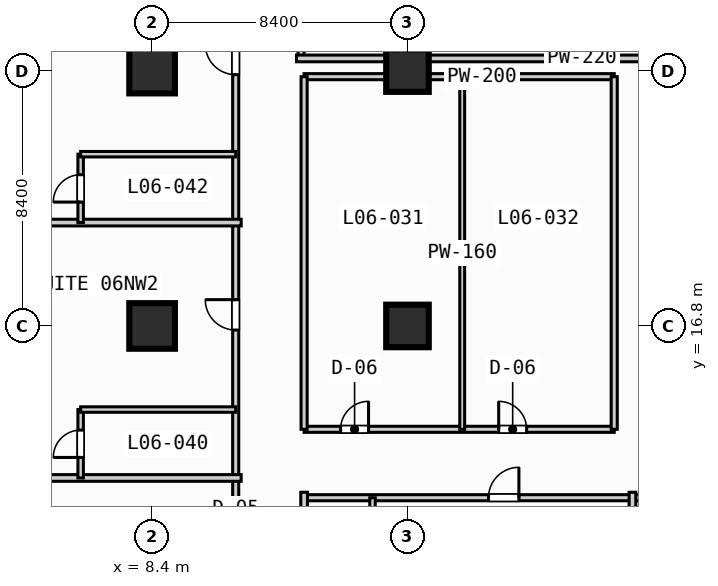
"""IFC4 building model, lengths in metres.
Left out: names, types, materials, properties, quantities, classifications, styles, units other than length and angle.
Written with IfcOpenShell. Run it as: python <this file> out.ifc"""

import sys

from ifc_helpers import new_model, si_unit, direction, frame, frame_2d, origin, origin_2d, place, context, subcontext, project, spatial, rectangle, extrude, element, fill, save


model = new_model("IFC4")
c1 = context("Model", 3, precision=1e-05, world=origin(), true_north=direction((0.0, 1.0)))
c2 = subcontext(c1, "Body", "Model", "MODEL_VIEW")
j1 = project(units=[si_unit("LENGTHUNIT", "METRE"), si_unit("PLANEANGLEUNIT", "RADIAN")], contexts=[c1])
p1 = place(None, origin())
s1 = spatial("IfcSite", under=j1, at=p1, CompositionType="ELEMENT")
p2 = place(p1, origin())
s2 = spatial("IfcBuilding", under=s1, at=p2, CompositionType="ELEMENT")
p3 = place(p2, frame((0.0, 0.0, 32.0)))
s3 = spatial("IfcBuildingStorey", under=s2, at=p3, CompositionType="ELEMENT", Elevation=32.0)
for number, where, z_axis, x_axis in (
    (1, (8.4, 16.8, 0.0), (0.0, 0.0, 1.0), (1.0, 0.0, 0.0)),
    (2, (8.4, 25.2, 0.0), (0.0, 0.0, 1.0), (1.0, 0.0, 0.0)),
):
    element("IfcColumn", number, at=place(p3, frame(where, z_axis=z_axis, x_axis=x_axis)), inside=s3, PredefinedType="COLUMN", context=c2, shape_type="SweptSolid", body=[
        extrude(rectangle(XDim=1.5, YDim=1.5, at=origin_2d()), origin(), (0.0, 0.0, 1.0), 3.8),
    ])
for number, where, z_axis, x_axis in (
    (3, (16.8, 16.8, 0.0), (0.0, 0.0, 1.0), (1.0, 0.0, 0.0)),
    (4, (16.8, 25.2, 0.0), (0.0, 0.0, 1.0), (1.0, 0.0, 0.0)),
):
    element("IfcColumn", number, at=place(p3, frame(where, z_axis=z_axis, x_axis=x_axis)), inside=s3, PredefinedType="COLUMN", context=c2, shape_type="SweptSolid", body=[
        extrude(rectangle(XDim=1.4, YDim=1.4, at=origin_2d()), origin(), (0.0, 0.0, 1.0), 3.8),
    ])
p4 = place(p3, frame((13.4, 13.4, 0.0), z_axis=(0.0, 0.0, 1.0), x_axis=(1.0, 0.0, 0.0)))
e5 = element("IfcWall", 5, at=p4, inside=s3, PredefinedType="PARTITIONING", context=c2, shape_type="SweptSolid", body=[
    extrude(rectangle(XDim=10.2, YDim=0.2, at=frame_2d((5.1, 0.0))), origin(), (0.0, 0.0, 1.0), 3.55),
])
p5 = place(p4, frame((1.2, 0.0, 0.0)))
e6 = element("IfcOpeningElement", 6, at=p5, cuts=e5, PredefinedType="OPENING", context=c2, shape_type="SweptSolid", body=[
    extrude(rectangle(XDim=0.92, YDim=2.1, at=frame_2d((0.46, 1.05))), frame((0.0, 0.11, 0.0), z_axis=(0.0, -1.0, 0.0), x_axis=(1.0, 0.0, 0.0)), (0.0, 0.0, 1.0), 0.22),
])
p6 = place(p4, frame((6.4, 0.0, 0.0)))
e7 = element("IfcOpeningElement", 7, at=p6, cuts=e5, PredefinedType="OPENING", context=c2, shape_type="SweptSolid", body=[
    extrude(rectangle(XDim=0.92, YDim=2.1, at=frame_2d((0.46, 1.05))), frame((0.0, 0.11, 0.0), z_axis=(0.0, -1.0, 0.0), x_axis=(1.0, 0.0, 0.0)), (0.0, 0.0, 1.0), 0.22),
])
p7 = place(p3, frame((18.6, 13.4, 0.0), z_axis=(0.0, 0.0, 1.0), x_axis=(0.0, 1.0, 0.0)))
e8 = element("IfcWall", 8, at=p7, inside=s3, PredefinedType="PARTITIONING", context=c2, shape_type="SweptSolid", body=[
    extrude(rectangle(XDim=11.6, YDim=0.16, at=frame_2d((5.8, 0.0))), origin(), (0.0, 0.0, 1.0), 3.55),
])
p8 = place(p3, frame((13.4, 25.0, 0.0), z_axis=(0.0, 0.0, 1.0), x_axis=(1.0, 0.0, 0.0)))
e9 = element("IfcWall", 9, at=p8, inside=s3, PredefinedType="PARTITIONING", context=c2, shape_type="SweptSolid", body=[
    extrude(rectangle(XDim=10.2, YDim=0.2, at=frame_2d((5.1, 0.0))), origin(), (0.0, 0.0, 1.0), 2.8),
])
for number, where, z_axis, x_axis in (
    (10, (13.4, 13.4, 0.0), (0.0, 0.0, 1.0), (0.0, 1.0, 0.0)),
    (11, (23.6, 13.4, 0.0), (0.0, 0.0, 1.0), (0.0, 1.0, 0.0)),
):
    element("IfcWall", number, at=place(p3, frame(where, z_axis=z_axis, x_axis=x_axis)), inside=s3, PredefinedType="PARTITIONING", context=c2, shape_type="SweptSolid", body=[
        extrude(rectangle(XDim=11.6, YDim=0.2, at=frame_2d((5.8, 0.0))), origin(), (0.0, 0.0, 1.0), 3.55),
    ])
p9 = place(p3, frame((13.3, 25.6, 0.0), z_axis=(0.0, 0.0, 1.0), x_axis=(0.0, 1.0, 0.0)))
e12 = element("IfcWall", 12, at=p9, inside=s3, PredefinedType="PARTITIONING", context=c2, shape_type="SweptSolid", body=[
    extrude(rectangle(XDim=13.6, YDim=0.2, at=frame_2d((6.8, 0.0))), origin(), (0.0, 0.0, 1.0), 3.55),
])
p10 = place(p9, frame((1.735, 0.0, 0.0)))
e13 = element("IfcOpeningElement", 13, at=p10, cuts=e12, PredefinedType="OPENING", context=c2, shape_type="SweptSolid", body=[
    extrude(rectangle(XDim=1.0, YDim=2.15, at=frame_2d((0.5, 1.075))), frame((0.0, 0.11, 0.0), z_axis=(0.0, -1.0, 0.0), x_axis=(1.0, 0.0, 0.0)), (0.0, 0.0, 1.0), 0.22),
])
p11 = place(p9, frame((8.535, 0.0, 0.0)))
e14 = element("IfcOpeningElement", 14, at=p11, cuts=e12, PredefinedType="OPENING", context=c2, shape_type="SweptSolid", body=[
    extrude(rectangle(XDim=1.0, YDim=2.15, at=frame_2d((0.5, 1.075))), frame((0.0, 0.11, 0.0), z_axis=(0.0, -1.0, 0.0), x_axis=(1.0, 0.0, 0.0)), (0.0, 0.0, 1.0), 0.22),
])
p12 = place(p3, frame((13.15, 25.6, 0.0), z_axis=(0.0, 0.0, 1.0), x_axis=(1.0, 0.0, 0.0)))
e15 = element("IfcWall", 15, at=p12, inside=s3, PredefinedType="PARTITIONING", context=c2, shape_type="SweptSolid", body=[
    extrude(rectangle(XDim=20.28, YDim=0.22, at=frame_2d((10.14, 0.0))), origin(), (0.0, 0.0, 1.0), 3.55),
])
p13 = place(p3, frame((11.15, 3.4, 0.0), z_axis=(0.0, 0.0, 1.0), x_axis=(0.0, 1.0, 0.0)))
e16 = element("IfcWall", 16, at=p13, inside=s3, PredefinedType="PARTITIONING", context=c2, shape_type="SweptSolid", body=[
    extrude(rectangle(XDim=85.4, YDim=0.2, at=frame_2d((42.7, 0.0))), origin(), (0.0, 0.0, 1.0), 3.55),
])
p14 = place(p13, frame((4.865, 0.0, 0.0)))
e17 = element("IfcOpeningElement", 17, at=p14, cuts=e16, PredefinedType="OPENING", context=c2, shape_type="SweptSolid", body=[
    extrude(rectangle(XDim=1.0, YDim=2.15, at=frame_2d((0.5, 1.075))), frame((0.0, 0.11, 0.0), z_axis=(0.0, -1.0, 0.0), x_axis=(1.0, 0.0, 0.0)), (0.0, 0.0, 1.0), 0.22),
])
p15 = place(p13, frame((13.265, 0.0, 0.0)))
e18 = element("IfcOpeningElement", 18, at=p15, cuts=e16, PredefinedType="OPENING", context=c2, shape_type="SweptSolid", body=[
    extrude(rectangle(XDim=1.0, YDim=2.15, at=frame_2d((0.5, 1.075))), frame((0.0, 0.11, 0.0), z_axis=(0.0, -1.0, 0.0), x_axis=(1.0, 0.0, 0.0)), (0.0, 0.0, 1.0), 0.22),
])
p16 = place(p13, frame((21.665, 0.0, 0.0)))
e19 = element("IfcOpeningElement", 19, at=p16, cuts=e16, PredefinedType="OPENING", context=c2, shape_type="SweptSolid", body=[
    extrude(rectangle(XDim=1.0, YDim=2.15, at=frame_2d((0.5, 1.075))), frame((0.0, 0.11, 0.0), z_axis=(0.0, -1.0, 0.0), x_axis=(1.0, 0.0, 0.0)), (0.0, 0.0, 1.0), 0.22),
])
p17 = place(p13, frame((30.065, 0.0, 0.0)))
e20 = element("IfcOpeningElement", 20, at=p17, cuts=e16, PredefinedType="OPENING", context=c2, shape_type="SweptSolid", body=[
    extrude(rectangle(XDim=1.0, YDim=2.15, at=frame_2d((0.5, 1.075))), frame((0.0, 0.11, 0.0), z_axis=(0.0, -1.0, 0.0), x_axis=(1.0, 0.0, 0.0)), (0.0, 0.0, 1.0), 0.22),
])
p18 = place(p13, frame((38.465, 0.0, 0.0)))
e21 = element("IfcOpeningElement", 21, at=p18, cuts=e16, PredefinedType="OPENING", context=c2, shape_type="SweptSolid", body=[
    extrude(rectangle(XDim=1.0, YDim=2.15, at=frame_2d((0.5, 1.075))), frame((0.0, 0.11, 0.0), z_axis=(0.0, -1.0, 0.0), x_axis=(1.0, 0.0, 0.0)), (0.0, 0.0, 1.0), 0.22),
])
p19 = place(p13, frame((46.865, 0.0, 0.0)))
e22 = element("IfcOpeningElement", 22, at=p19, cuts=e16, PredefinedType="OPENING", context=c2, shape_type="SweptSolid", body=[
    extrude(rectangle(XDim=1.0, YDim=2.15, at=frame_2d((0.5, 1.075))), frame((0.0, 0.11, 0.0), z_axis=(0.0, -1.0, 0.0), x_axis=(1.0, 0.0, 0.0)), (0.0, 0.0, 1.0), 0.22),
])
p20 = place(p13, frame((55.265, 0.0, 0.0)))
e23 = element("IfcOpeningElement", 23, at=p20, cuts=e16, PredefinedType="OPENING", context=c2, shape_type="SweptSolid", body=[
    extrude(rectangle(XDim=1.0, YDim=2.15, at=frame_2d((0.5, 1.075))), frame((0.0, 0.11, 0.0), z_axis=(0.0, -1.0, 0.0), x_axis=(1.0, 0.0, 0.0)), (0.0, 0.0, 1.0), 0.22),
])
p21 = place(p13, frame((63.665, 0.0, 0.0)))
e24 = element("IfcOpeningElement", 24, at=p21, cuts=e16, PredefinedType="OPENING", context=c2, shape_type="SweptSolid", body=[
    extrude(rectangle(XDim=1.0, YDim=2.15, at=frame_2d((0.5, 1.075))), frame((0.0, 0.11, 0.0), z_axis=(0.0, -1.0, 0.0), x_axis=(1.0, 0.0, 0.0)), (0.0, 0.0, 1.0), 0.22),
])
p22 = place(p13, frame((72.065, 0.0, 0.0)))
e25 = element("IfcOpeningElement", 25, at=p22, cuts=e16, PredefinedType="OPENING", context=c2, shape_type="SweptSolid", body=[
    extrude(rectangle(XDim=1.0, YDim=2.15, at=frame_2d((0.5, 1.075))), frame((0.0, 0.11, 0.0), z_axis=(0.0, -1.0, 0.0), x_axis=(1.0, 0.0, 0.0)), (0.0, 0.0, 1.0), 0.22),
])
p23 = place(p13, frame((81.165, 0.0, 0.0)))
e26 = element("IfcOpeningElement", 26, at=p23, cuts=e16, PredefinedType="OPENING", context=c2, shape_type="SweptSolid", body=[
    extrude(rectangle(XDim=1.0, YDim=2.15, at=frame_2d((0.5, 1.075))), frame((0.0, 0.11, 0.0), z_axis=(0.0, -1.0, 0.0), x_axis=(1.0, 0.0, 0.0)), (0.0, 0.0, 1.0), 0.22),
])
p24 = place(p3, frame((0.2, 11.8, 0.0), z_axis=(0.0, 0.0, 1.0), x_axis=(1.0, 0.0, 0.0)))
e27 = element("IfcWall", 27, at=p24, inside=s3, PredefinedType="PARTITIONING", context=c2, shape_type="SweptSolid", body=[
    extrude(rectangle(XDim=11.13, YDim=0.22, at=frame_2d((5.565, 0.0))), origin(), (0.0, 0.0, 1.0), 3.55),
])
p25 = place(p3, frame((6.05, 11.8, 0.0), z_axis=(0.0, 0.0, 1.0), x_axis=(0.0, 1.0, 0.0)))
e28 = element("IfcWall", 28, at=p25, inside=s3, PredefinedType="PLUMBINGWALL", context=c2, shape_type="SweptSolid", body=[
    extrude(rectangle(XDim=2.25, YDim=0.18, at=frame_2d((1.125, 0.0))), origin(), (0.0, 0.0, 1.0), 3.55),
])
p26 = place(p25, frame((0.675, 0.0, 0.0)))
e29 = element("IfcOpeningElement", 29, at=p26, cuts=e28, PredefinedType="OPENING", context=c2, shape_type="SweptSolid", body=[
    extrude(rectangle(XDim=0.9, YDim=2.1, at=frame_2d((0.45, 1.05))), frame((0.0, 0.1, 0.0), z_axis=(0.0, -1.0, 0.0), x_axis=(1.0, 0.0, 0.0)), (0.0, 0.0, 1.0), 0.2),
])
p27 = place(p3, frame((6.05, 14.05, 0.0), z_axis=(0.0, 0.0, 1.0), x_axis=(1.0, 0.0, 0.0)))
e30 = element("IfcWall", 30, at=p27, inside=s3, PredefinedType="PLUMBINGWALL", context=c2, shape_type="SweptSolid", body=[
    extrude(rectangle(XDim=5.1, YDim=0.18, at=frame_2d((2.55, 0.0))), origin(), (0.0, 0.0, 1.0), 3.55),
])
p28 = place(p3, frame((0.2, 20.2, 0.0), z_axis=(0.0, 0.0, 1.0), x_axis=(1.0, 0.0, 0.0)))
e31 = element("IfcWall", 31, at=p28, inside=s3, PredefinedType="PARTITIONING", context=c2, shape_type="SweptSolid", body=[
    extrude(rectangle(XDim=11.13, YDim=0.22, at=frame_2d((5.565, 0.0))), origin(), (0.0, 0.0, 1.0), 3.55),
])
p29 = place(p3, frame((6.05, 20.2, 0.0), z_axis=(0.0, 0.0, 1.0), x_axis=(0.0, 1.0, 0.0)))
e32 = element("IfcWall", 32, at=p29, inside=s3, PredefinedType="PLUMBINGWALL", context=c2, shape_type="SweptSolid", body=[
    extrude(rectangle(XDim=2.25, YDim=0.18, at=frame_2d((1.125, 0.0))), origin(), (0.0, 0.0, 1.0), 3.55),
])
p30 = place(p29, frame((0.675, 0.0, 0.0)))
e33 = element("IfcOpeningElement", 33, at=p30, cuts=e32, PredefinedType="OPENING", context=c2, shape_type="SweptSolid", body=[
    extrude(rectangle(XDim=0.9, YDim=2.1, at=frame_2d((0.45, 1.05))), frame((0.0, 0.1, 0.0), z_axis=(0.0, -1.0, 0.0), x_axis=(1.0, 0.0, 0.0)), (0.0, 0.0, 1.0), 0.2),
])
p31 = place(p3, frame((6.05, 22.45, 0.0), z_axis=(0.0, 0.0, 1.0), x_axis=(1.0, 0.0, 0.0)))
e34 = element("IfcWall", 34, at=p31, inside=s3, PredefinedType="PLUMBINGWALL", context=c2, shape_type="SweptSolid", body=[
    extrude(rectangle(XDim=5.1, YDim=0.18, at=frame_2d((2.55, 0.0))), origin(), (0.0, 0.0, 1.0), 3.55),
])
p32 = place(p3, frame((13.4, 11.15, 0.0), z_axis=(0.0, 0.0, 1.0), x_axis=(1.0, 0.0, 0.0)))
e35 = element("IfcWall", 35, at=p32, inside=s3, PredefinedType="PARTITIONING", context=c2, shape_type="SweptSolid", body=[
    extrude(rectangle(XDim=75.4, YDim=0.2, at=frame_2d((37.7, 0.0))), origin(), (0.0, 0.0, 1.0), 3.55),
])
p33 = place(p32, frame((6.065, 0.0, 0.0)))
e36 = element("IfcOpeningElement", 36, at=p33, cuts=e35, PredefinedType="OPENING", context=c2, shape_type="SweptSolid", body=[
    extrude(rectangle(XDim=1.0, YDim=2.15, at=frame_2d((0.5, 1.075))), frame((0.0, 0.11, 0.0), z_axis=(0.0, -1.0, 0.0), x_axis=(1.0, 0.0, 0.0)), (0.0, 0.0, 1.0), 0.22),
])
p34 = place(p32, frame((13.36, 0.0, 0.0)))
e37 = element("IfcOpeningElement", 37, at=p34, cuts=e35, PredefinedType="OPENING", context=c2, shape_type="SweptSolid", body=[
    extrude(rectangle(XDim=1.0, YDim=2.15, at=frame_2d((0.5, 1.075))), frame((0.0, 0.11, 0.0), z_axis=(0.0, -1.0, 0.0), x_axis=(1.0, 0.0, 0.0)), (0.0, 0.0, 1.0), 0.22),
])
p35 = place(p32, frame((21.785, 0.0, 0.0)))
e38 = element("IfcOpeningElement", 38, at=p35, cuts=e35, PredefinedType="OPENING", context=c2, shape_type="SweptSolid", body=[
    extrude(rectangle(XDim=1.0, YDim=2.15, at=frame_2d((0.5, 1.075))), frame((0.0, 0.11, 0.0), z_axis=(0.0, -1.0, 0.0), x_axis=(1.0, 0.0, 0.0)), (0.0, 0.0, 1.0), 0.22),
])
p36 = place(p32, frame((30.185, 0.0, 0.0)))
e39 = element("IfcOpeningElement", 39, at=p36, cuts=e35, PredefinedType="OPENING", context=c2, shape_type="SweptSolid", body=[
    extrude(rectangle(XDim=1.0, YDim=2.15, at=frame_2d((0.5, 1.075))), frame((0.0, 0.11, 0.0), z_axis=(0.0, -1.0, 0.0), x_axis=(1.0, 0.0, 0.0)), (0.0, 0.0, 1.0), 0.22),
])
p37 = place(p32, frame((41.76, 0.0, 0.0)))
e40 = element("IfcOpeningElement", 40, at=p37, cuts=e35, PredefinedType="OPENING", context=c2, shape_type="SweptSolid", body=[
    extrude(rectangle(XDim=1.0, YDim=2.15, at=frame_2d((0.5, 1.075))), frame((0.0, 0.11, 0.0), z_axis=(0.0, -1.0, 0.0), x_axis=(1.0, 0.0, 0.0)), (0.0, 0.0, 1.0), 0.22),
])
p38 = place(p32, frame((54.36, 0.0, 0.0)))
e41 = element("IfcOpeningElement", 41, at=p38, cuts=e35, PredefinedType="OPENING", context=c2, shape_type="SweptSolid", body=[
    extrude(rectangle(XDim=1.0, YDim=2.15, at=frame_2d((0.5, 1.075))), frame((0.0, 0.11, 0.0), z_axis=(0.0, -1.0, 0.0), x_axis=(1.0, 0.0, 0.0)), (0.0, 0.0, 1.0), 0.22),
])
p39 = place(p32, frame((63.785, 0.0, 0.0)))
e42 = element("IfcOpeningElement", 42, at=p39, cuts=e35, PredefinedType="OPENING", context=c2, shape_type="SweptSolid", body=[
    extrude(rectangle(XDim=1.0, YDim=2.15, at=frame_2d((0.5, 1.075))), frame((0.0, 0.11, 0.0), z_axis=(0.0, -1.0, 0.0), x_axis=(1.0, 0.0, 0.0)), (0.0, 0.0, 1.0), 0.22),
])
p40 = place(p32, frame((70.86, 0.0, 0.0)))
e43 = element("IfcOpeningElement", 43, at=p40, cuts=e35, PredefinedType="OPENING", context=c2, shape_type="SweptSolid", body=[
    extrude(rectangle(XDim=1.0, YDim=2.15, at=frame_2d((0.5, 1.075))), frame((0.0, 0.11, 0.0), z_axis=(0.0, -1.0, 0.0), x_axis=(1.0, 0.0, 0.0)), (0.0, 0.0, 1.0), 0.22),
])
p41 = place(p3, frame((13.4, 0.2, 0.0), z_axis=(0.0, 0.0, 1.0), x_axis=(0.0, 1.0, 0.0)))
e44 = element("IfcWall", 44, at=p41, inside=s3, PredefinedType="PARTITIONING", context=c2, shape_type="SweptSolid", body=[
    extrude(rectangle(XDim=11.13, YDim=0.22, at=frame_2d((5.565, 0.0))), origin(), (0.0, 0.0, 1.0), 3.55),
])
p42 = place(p3, frame((15.65, 6.05, 0.0), z_axis=(0.0, 0.0, 1.0), x_axis=(0.0, 1.0, 0.0)))
e45 = element("IfcWall", 45, at=p42, inside=s3, PredefinedType="PLUMBINGWALL", context=c2, shape_type="SweptSolid", body=[
    extrude(rectangle(XDim=5.1, YDim=0.18, at=frame_2d((2.55, 0.0))), origin(), (0.0, 0.0, 1.0), 3.55),
])
p43 = place(p3, frame((24.2, 0.2, 0.0), z_axis=(0.0, 0.0, 1.0), x_axis=(0.0, 1.0, 0.0)))
e46 = element("IfcWall", 46, at=p43, inside=s3, PredefinedType="PARTITIONING", context=c2, shape_type="SweptSolid", body=[
    extrude(rectangle(XDim=11.13, YDim=0.22, at=frame_2d((5.565, 0.0))), origin(), (0.0, 0.0, 1.0), 3.55),
])
p44 = place(p5, origin())
e47 = element("IfcDoor", 47, at=p44, inside=s3, OperationType="SINGLE_SWING_RIGHT", PredefinedType="DOOR", context=c2, shape_type="SweptSolid", body=[
    extrude(rectangle(XDim=0.92, YDim=2.1, at=frame_2d((0.46, 1.05))), frame((0.0, 0.025, 0.0), z_axis=(0.0, -1.0, 0.0), x_axis=(1.0, 0.0, 0.0)), (0.0, 0.0, 1.0), 0.05),
])
fill(e6, e47)
p45 = place(p6, origin())
e48 = element("IfcDoor", 48, at=p45, inside=s3, OperationType="SINGLE_SWING_LEFT", PredefinedType="DOOR", context=c2, shape_type="SweptSolid", body=[
    extrude(rectangle(XDim=0.92, YDim=2.1, at=frame_2d((0.46, 1.05))), frame((0.0, 0.025, 0.0), z_axis=(0.0, -1.0, 0.0), x_axis=(1.0, 0.0, 0.0)), (0.0, 0.0, 1.0), 0.05),
])
fill(e7, e48)
p46 = place(p15, origin())
e49 = element("IfcDoor", 49, at=p46, inside=s3, OperationType="SINGLE_SWING_RIGHT", PredefinedType="DOOR", context=c2, shape_type="SweptSolid", body=[
    extrude(rectangle(XDim=1.0, YDim=2.15, at=frame_2d((0.5, 1.075))), frame((0.0, 0.025, 0.0), z_axis=(0.0, -1.0, 0.0), x_axis=(1.0, 0.0, 0.0)), (0.0, 0.0, 1.0), 0.05),
])
fill(e18, e49)
p47 = place(p16, origin())
e50 = element("IfcDoor", 50, at=p47, inside=s3, OperationType="SINGLE_SWING_RIGHT", PredefinedType="DOOR", context=c2, shape_type="SweptSolid", body=[
    extrude(rectangle(XDim=1.0, YDim=2.15, at=frame_2d((0.5, 1.075))), frame((0.0, 0.025, 0.0), z_axis=(0.0, -1.0, 0.0), x_axis=(1.0, 0.0, 0.0)), (0.0, 0.0, 1.0), 0.05),
])
fill(e19, e50)
p48 = place(p26, origin())
e51 = element("IfcDoor", 51, at=p48, inside=s3, OperationType="SINGLE_SWING_LEFT", PredefinedType="DOOR", context=c2, shape_type="SweptSolid", body=[
    extrude(rectangle(XDim=0.9, YDim=2.1, at=frame_2d((0.45, 1.05))), frame((0.0, 0.025, 0.0), z_axis=(0.0, -1.0, 0.0), x_axis=(1.0, 0.0, 0.0)), (0.0, 0.0, 1.0), 0.05),
])
fill(e29, e51)
p49 = place(p30, origin())
e52 = element("IfcDoor", 52, at=p49, inside=s3, OperationType="SINGLE_SWING_LEFT", PredefinedType="DOOR", context=c2, shape_type="SweptSolid", body=[
    extrude(rectangle(XDim=0.9, YDim=2.1, at=frame_2d((0.45, 1.05))), frame((0.0, 0.025, 0.0), z_axis=(0.0, -1.0, 0.0), x_axis=(1.0, 0.0, 0.0)), (0.0, 0.0, 1.0), 0.05),
])
fill(e33, e52)
p50 = place(p33, origin())
e53 = element("IfcDoor", 53, at=p50, inside=s3, OperationType="SINGLE_SWING_RIGHT", PredefinedType="DOOR", context=c2, shape_type="SweptSolid", body=[
    extrude(rectangle(XDim=1.0, YDim=2.15, at=frame_2d((0.5, 1.075))), frame((0.0, 0.025, 0.0), z_axis=(0.0, -1.0, 0.0), x_axis=(1.0, 0.0, 0.0)), (0.0, 0.0, 1.0), 0.05),
])
fill(e36, e53)
save(model, sys.argv[1])
